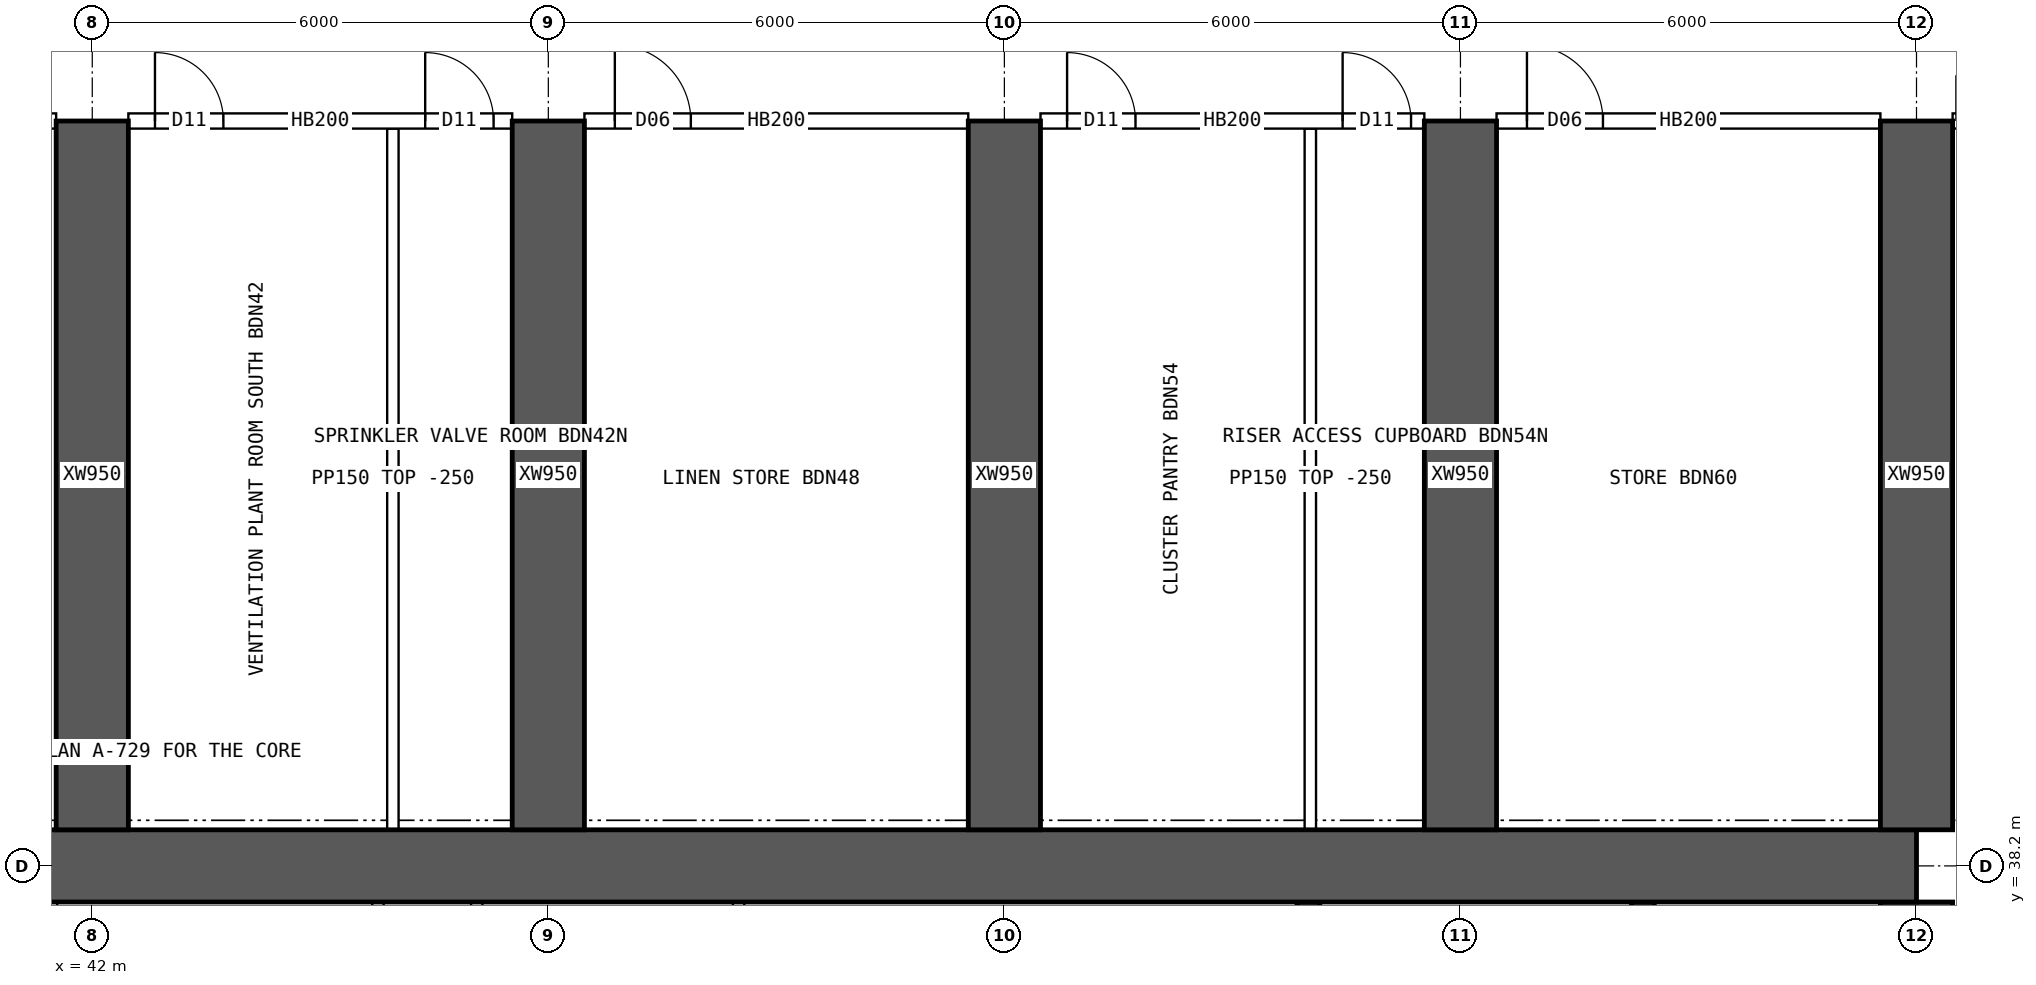
"""IFC4 building model, lengths in metres.
Left out: names, types, materials, properties, quantities, classifications, styles, units other than length and angle.
Written with IfcOpenShell. Run it as: python <this file> out.ifc"""

import sys

from ifc_helpers import new_model, si_unit, direction, frame, frame_2d, origin, place, context, subcontext, project, spatial, rectangle, extrude, element, fill, save


model = new_model("IFC4")
c1 = context("Model", 3, precision=1e-05, world=origin(), true_north=direction((0.0, 1.0)))
c2 = subcontext(c1, "Body", "Model", "MODEL_VIEW")
j1 = project(units=[si_unit("LENGTHUNIT", "METRE"), si_unit("PLANEANGLEUNIT", "RADIAN")], contexts=[c1])
p1 = place(None, origin())
s1 = spatial("IfcSite", under=j1, at=p1, CompositionType="ELEMENT")
p2 = place(p1, origin())
s2 = spatial("IfcBuilding", under=s1, at=p2, CompositionType="ELEMENT")
p3 = place(p2, frame((0.0, 0.0, 106.9)))
s3 = spatial("IfcBuildingStorey", under=s2, at=p3, CompositionType="ELEMENT", Elevation=106.9)
p4 = place(p3, frame((18.0, 38.2, 0.0), z_axis=(0.0, 0.0, 1.0), x_axis=(1.0, 0.0, 0.0)))
e1 = element("IfcWall", 1, at=p4, inside=s3, PredefinedType="SHEAR", context=c2, shape_type="SweptSolid", body=[
    extrude(rectangle(XDim=48.0, YDim=0.95, at=frame_2d((24.0, 0.0))), origin(), (0.0, 0.0, 1.0), 3.75),
])
p5 = place(p3, frame((66.0, 26.275, 0.0), z_axis=(0.0, 0.0, 1.0), x_axis=(0.0, 1.0, 0.0)))
e2 = element("IfcWall", 2, at=p5, inside=s3, PredefinedType="SHEAR", context=c2, shape_type="SweptSolid", body=[
    extrude(rectangle(XDim=11.45, YDim=0.95, at=frame_2d((5.725, 0.0))), origin(), (0.0, 0.0, 1.0), 3.75),
])
p6 = place(p5, frame((5.025, 0.0, 0.0)))
e3 = element("IfcOpeningElement", 3, at=p6, cuts=e2, PredefinedType="OPENING", context=c2, shape_type="SweptSolid", body=[
    extrude(rectangle(XDim=1.2, YDim=2.1, at=frame_2d((0.6, 1.05))), frame((0.0, 0.485, 0.0), z_axis=(0.0, -1.0, 0.0), x_axis=(1.0, 0.0, 0.0)), (0.0, 0.0, 1.0), 0.97),
])
for number, where, z_axis, x_axis in (
    (4, (62.4, 34.75, 0.0), (0.0, 0.0, 1.0), (0.0, 1.0, 0.0)),
    (5, (58.0, 34.75, 0.0), (0.0, 0.0, 1.0), (0.0, 1.0, 0.0)),
):
    element("IfcWall", number, at=place(p3, frame(where, z_axis=z_axis, x_axis=x_axis)), inside=s3, PredefinedType="SHEAR", context=c2, shape_type="SweptSolid", body=[
        extrude(rectangle(XDim=2.975, YDim=0.3, at=frame_2d((1.488, 0.0))), origin(), (0.0, 0.0, 1.0), 3.75),
    ])
for number, where, z_axis, x_axis in (
    (6, (42.0, 38.675, 0.0), (0.0, 0.0, 1.0), (0.0, 1.0, 0.0)),
    (7, (48.0, 38.675, 0.0), (0.0, 0.0, 1.0), (0.0, 1.0, 0.0)),
    (8, (54.0, 38.675, 0.0), (0.0, 0.0, 1.0), (0.0, 1.0, 0.0)),
    (9, (60.0, 38.675, 0.0), (0.0, 0.0, 1.0), (0.0, 1.0, 0.0)),
    (10, (66.0, 38.675, 0.0), (0.0, 0.0, 1.0), (0.0, 1.0, 0.0)),
):
    element("IfcWall", number, at=place(p3, frame(where, z_axis=z_axis, x_axis=x_axis)), inside=s3, PredefinedType="SHEAR", context=c2, shape_type="SweptSolid", body=[
        extrude(rectangle(XDim=9.325, YDim=0.95, at=frame_2d((4.663, 0.0))), origin(), (0.0, 0.0, 1.0), 3.75),
    ])
for number, where, z_axis, x_axis in (
    (11, (41.463, 34.75, 0.0), (0.0, 0.0, 1.0), (0.0, 1.0, 0.0)),
    (12, (45.758, 34.75, 0.0), (0.0, 0.0, 1.0), (0.0, 1.0, 0.0)),
    (13, (47.058, 34.75, 0.0), (0.0, 0.0, 1.0), (0.0, 1.0, 0.0)),
    (14, (50.503, 34.75, 0.0), (0.0, 0.0, 1.0), (0.0, 1.0, 0.0)),
):
    element("IfcWall", number, at=place(p3, frame(where, z_axis=z_axis, x_axis=x_axis)), inside=s3, PredefinedType="SOLIDWALL", context=c2, shape_type="SweptSolid", body=[
        extrude(rectangle(XDim=2.975, YDim=0.15, at=frame_2d((1.488, 0.0))), origin(), (0.0, 0.0, 1.0), 3.5),
    ])
p7 = place(p3, frame((36.475, 48.0, 0.0), z_axis=(0.0, 0.0, 1.0), x_axis=(1.0, 0.0, 0.0)))
e15 = element("IfcWall", 15, at=p7, inside=s3, PredefinedType="SOLIDWALL", context=c2, shape_type="SweptSolid", body=[
    extrude(rectangle(XDim=5.05, YDim=0.2, at=frame_2d((2.525, 0.0))), origin(), (0.0, 0.0, 1.0), 3.5),
])
p8 = place(p7, frame((0.4, 0.0, 0.0)))
e16 = element("IfcOpeningElement", 16, at=p8, cuts=e15, PredefinedType="OPENING", context=c2, shape_type="SweptSolid", body=[
    extrude(rectangle(XDim=1.0, YDim=2.1, at=frame_2d((0.5, 1.05))), frame((0.0, 0.11, 0.0), z_axis=(0.0, -1.0, 0.0), x_axis=(1.0, 0.0, 0.0)), (0.0, 0.0, 1.0), 0.22),
])
p9 = place(p3, frame((42.475, 48.0, 0.0), z_axis=(0.0, 0.0, 1.0), x_axis=(1.0, 0.0, 0.0)))
e17 = element("IfcWall", 17, at=p9, inside=s3, PredefinedType="SOLIDWALL", context=c2, shape_type="SweptSolid", body=[
    extrude(rectangle(XDim=5.05, YDim=0.2, at=frame_2d((2.525, 0.0))), origin(), (0.0, 0.0, 1.0), 3.5),
])
p10 = place(p9, frame((0.35, 0.0, 0.0)))
e18 = element("IfcOpeningElement", 18, at=p10, cuts=e17, PredefinedType="OPENING", context=c2, shape_type="SweptSolid", body=[
    extrude(rectangle(XDim=0.9, YDim=2.1, at=frame_2d((0.45, 1.05))), frame((0.0, 0.11, 0.0), z_axis=(0.0, -1.0, 0.0), x_axis=(1.0, 0.0, 0.0)), (0.0, 0.0, 1.0), 0.22),
])
p11 = place(p9, frame((3.905, 0.0, 0.0)))
e19 = element("IfcOpeningElement", 19, at=p11, cuts=e17, PredefinedType="OPENING", context=c2, shape_type="SweptSolid", body=[
    extrude(rectangle(XDim=0.9, YDim=2.1, at=frame_2d((0.45, 1.05))), frame((0.0, 0.11, 0.0), z_axis=(0.0, -1.0, 0.0), x_axis=(1.0, 0.0, 0.0)), (0.0, 0.0, 1.0), 0.22),
])
p12 = place(p3, frame((48.475, 48.0, 0.0), z_axis=(0.0, 0.0, 1.0), x_axis=(1.0, 0.0, 0.0)))
e20 = element("IfcWall", 20, at=p12, inside=s3, PredefinedType="SOLIDWALL", context=c2, shape_type="SweptSolid", body=[
    extrude(rectangle(XDim=5.05, YDim=0.2, at=frame_2d((2.525, 0.0))), origin(), (0.0, 0.0, 1.0), 3.5),
])
p13 = place(p12, frame((0.4, 0.0, 0.0)))
e21 = element("IfcOpeningElement", 21, at=p13, cuts=e20, PredefinedType="OPENING", context=c2, shape_type="SweptSolid", body=[
    extrude(rectangle(XDim=1.0, YDim=2.1, at=frame_2d((0.5, 1.05))), frame((0.0, 0.11, 0.0), z_axis=(0.0, -1.0, 0.0), x_axis=(1.0, 0.0, 0.0)), (0.0, 0.0, 1.0), 0.22),
])
p14 = place(p3, frame((54.475, 48.0, 0.0), z_axis=(0.0, 0.0, 1.0), x_axis=(1.0, 0.0, 0.0)))
e22 = element("IfcWall", 22, at=p14, inside=s3, PredefinedType="SOLIDWALL", context=c2, shape_type="SweptSolid", body=[
    extrude(rectangle(XDim=5.05, YDim=0.2, at=frame_2d((2.525, 0.0))), origin(), (0.0, 0.0, 1.0), 3.5),
])
p15 = place(p14, frame((0.35, 0.0, 0.0)))
e23 = element("IfcOpeningElement", 23, at=p15, cuts=e22, PredefinedType="OPENING", context=c2, shape_type="SweptSolid", body=[
    extrude(rectangle(XDim=0.9, YDim=2.1, at=frame_2d((0.45, 1.05))), frame((0.0, 0.11, 0.0), z_axis=(0.0, -1.0, 0.0), x_axis=(1.0, 0.0, 0.0)), (0.0, 0.0, 1.0), 0.22),
])
p16 = place(p14, frame((3.975, 0.0, 0.0)))
e24 = element("IfcOpeningElement", 24, at=p16, cuts=e22, PredefinedType="OPENING", context=c2, shape_type="SweptSolid", body=[
    extrude(rectangle(XDim=0.9, YDim=2.1, at=frame_2d((0.45, 1.05))), frame((0.0, 0.11, 0.0), z_axis=(0.0, -1.0, 0.0), x_axis=(1.0, 0.0, 0.0)), (0.0, 0.0, 1.0), 0.22),
])
p17 = place(p3, frame((60.475, 48.0, 0.0), z_axis=(0.0, 0.0, 1.0), x_axis=(1.0, 0.0, 0.0)))
e25 = element("IfcWall", 25, at=p17, inside=s3, PredefinedType="SOLIDWALL", context=c2, shape_type="SweptSolid", body=[
    extrude(rectangle(XDim=5.05, YDim=0.2, at=frame_2d((2.525, 0.0))), origin(), (0.0, 0.0, 1.0), 3.5),
])
p18 = place(p17, frame((0.4, 0.0, 0.0)))
e26 = element("IfcOpeningElement", 26, at=p18, cuts=e25, PredefinedType="OPENING", context=c2, shape_type="SweptSolid", body=[
    extrude(rectangle(XDim=1.0, YDim=2.1, at=frame_2d((0.5, 1.05))), frame((0.0, 0.11, 0.0), z_axis=(0.0, -1.0, 0.0), x_axis=(1.0, 0.0, 0.0)), (0.0, 0.0, 1.0), 0.22),
])
p19 = place(p3, frame((66.475, 48.0, 0.0), z_axis=(0.0, 0.0, 1.0), x_axis=(1.0, 0.0, 0.0)))
e27 = element("IfcWall", 27, at=p19, inside=s3, PredefinedType="SOLIDWALL", context=c2, shape_type="SweptSolid", body=[
    extrude(rectangle(XDim=1.925, YDim=0.2, at=frame_2d((0.962, 0.0))), origin(), (0.0, 0.0, 1.0), 3.5),
])
p20 = place(p19, frame((0.05, 0.0, 0.0)))
e28 = element("IfcOpeningElement", 28, at=p20, cuts=e27, PredefinedType="OPENING", context=c2, shape_type="SweptSolid", body=[
    extrude(rectangle(XDim=1.2, YDim=2.1, at=frame_2d((0.6, 1.05))), frame((0.0, 0.11, 0.0), z_axis=(0.0, -1.0, 0.0), x_axis=(1.0, 0.0, 0.0)), (0.0, 0.0, 1.0), 0.22),
])
for number, where, z_axis, x_axis in (
    (29, (45.955, 38.675, 0.0), (0.0, 0.0, 1.0), (0.0, 1.0, 0.0)),
    (30, (58.025, 38.675, 0.0), (0.0, 0.0, 1.0), (0.0, 1.0, 0.0)),
):
    element("IfcWall", number, at=place(p3, frame(where, z_axis=z_axis, x_axis=x_axis)), inside=s3, PredefinedType="PARTITIONING", context=c2, shape_type="SweptSolid", body=[
        extrude(rectangle(XDim=9.225, YDim=0.15, at=frame_2d((4.612, 0.0))), origin(), (0.0, 0.0, 1.0), 3.5),
    ])
p21 = place(p10, origin())
e31 = element("IfcDoor", 31, at=p21, inside=s3, OperationType="SINGLE_SWING_LEFT", PredefinedType="DOOR", context=c2, shape_type="SweptSolid", body=[
    extrude(rectangle(XDim=0.9, YDim=2.1, at=frame_2d((0.45, 1.05))), frame((0.0, 0.025, 0.0), z_axis=(0.0, -1.0, 0.0), x_axis=(1.0, 0.0, 0.0)), (0.0, 0.0, 1.0), 0.05),
])
fill(e18, e31)
p22 = place(p11, origin())
e32 = element("IfcDoor", 32, at=p22, inside=s3, OperationType="SINGLE_SWING_LEFT", PredefinedType="DOOR", context=c2, shape_type="SweptSolid", body=[
    extrude(rectangle(XDim=0.9, YDim=2.1, at=frame_2d((0.45, 1.05))), frame((0.0, 0.025, 0.0), z_axis=(0.0, -1.0, 0.0), x_axis=(1.0, 0.0, 0.0)), (0.0, 0.0, 1.0), 0.05),
])
fill(e19, e32)
p23 = place(p13, origin())
e33 = element("IfcDoor", 33, at=p23, inside=s3, OperationType="SINGLE_SWING_LEFT", PredefinedType="DOOR", context=c2, shape_type="SweptSolid", body=[
    extrude(rectangle(XDim=1.0, YDim=2.1, at=frame_2d((0.5, 1.05))), frame((0.0, 0.025, 0.0), z_axis=(0.0, -1.0, 0.0), x_axis=(1.0, 0.0, 0.0)), (0.0, 0.0, 1.0), 0.05),
])
fill(e21, e33)
p24 = place(p15, origin())
e34 = element("IfcDoor", 34, at=p24, inside=s3, OperationType="SINGLE_SWING_LEFT", PredefinedType="DOOR", context=c2, shape_type="SweptSolid", body=[
    extrude(rectangle(XDim=0.9, YDim=2.1, at=frame_2d((0.45, 1.05))), frame((0.0, 0.025, 0.0), z_axis=(0.0, -1.0, 0.0), x_axis=(1.0, 0.0, 0.0)), (0.0, 0.0, 1.0), 0.05),
])
fill(e23, e34)
p25 = place(p16, origin())
e35 = element("IfcDoor", 35, at=p25, inside=s3, OperationType="SINGLE_SWING_LEFT", PredefinedType="DOOR", context=c2, shape_type="SweptSolid", body=[
    extrude(rectangle(XDim=0.9, YDim=2.1, at=frame_2d((0.45, 1.05))), frame((0.0, 0.025, 0.0), z_axis=(0.0, -1.0, 0.0), x_axis=(1.0, 0.0, 0.0)), (0.0, 0.0, 1.0), 0.05),
])
fill(e24, e35)
p26 = place(p18, origin())
e36 = element("IfcDoor", 36, at=p26, inside=s3, OperationType="SINGLE_SWING_LEFT", PredefinedType="DOOR", context=c2, shape_type="SweptSolid", body=[
    extrude(rectangle(XDim=1.0, YDim=2.1, at=frame_2d((0.5, 1.05))), frame((0.0, 0.025, 0.0), z_axis=(0.0, -1.0, 0.0), x_axis=(1.0, 0.0, 0.0)), (0.0, 0.0, 1.0), 0.05),
])
fill(e26, e36)
save(model, sys.argv[1])
